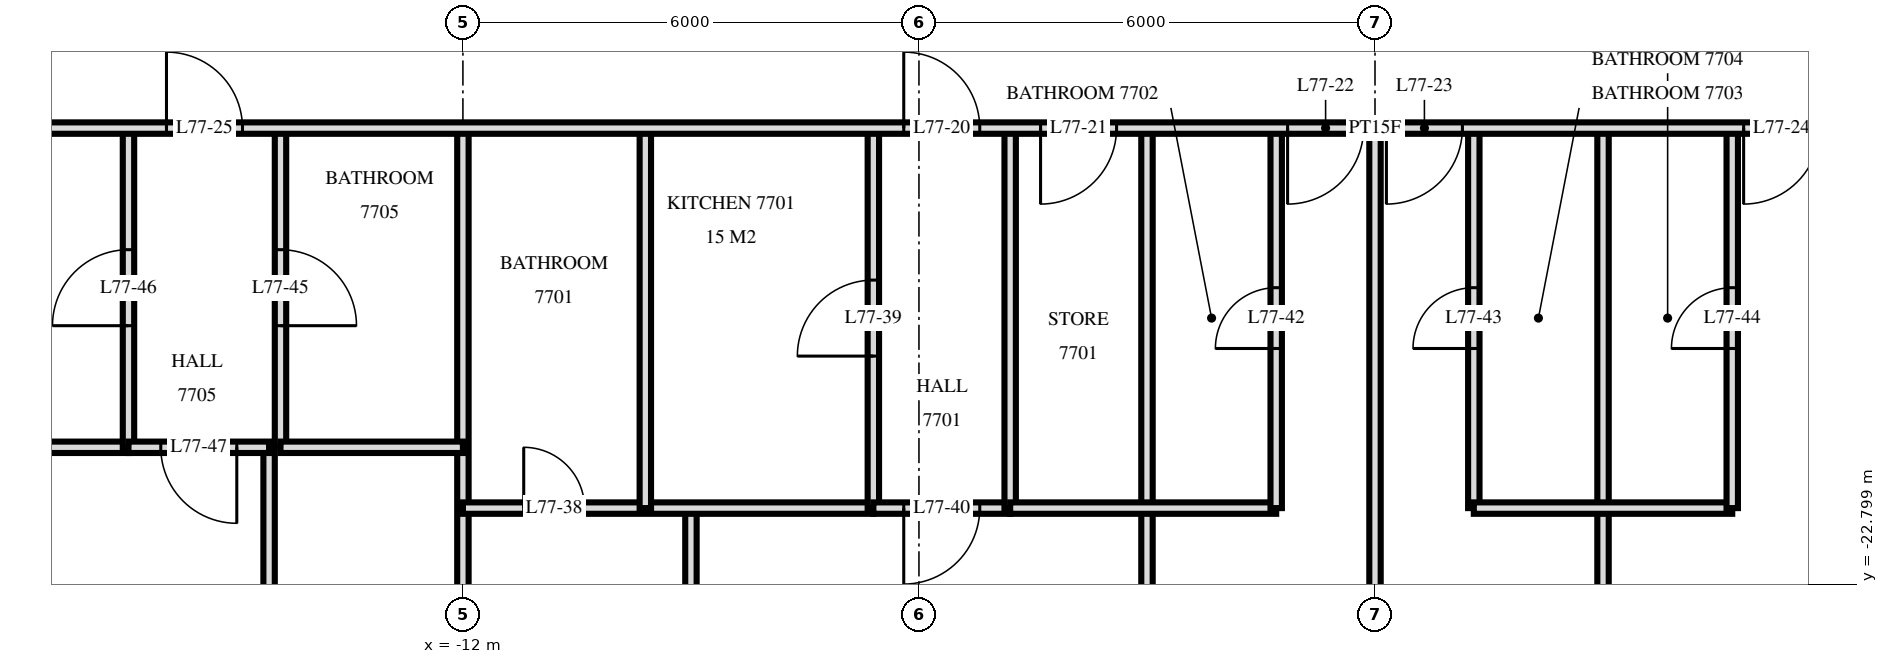
"""IFC4 building model, lengths in metres.
Left out: names, types, materials, properties, quantities, classifications, styles, units other than length and angle.
Written with IfcOpenShell. Run it as: python <this file> out.ifc"""

import sys

from ifc_helpers import new_model, si_unit, direction, frame, frame_2d, origin, place, context, subcontext, project, spatial, rectangle, extrude, element, fill, save


model = new_model("IFC4")
c1 = context("Model", 3, precision=1e-05, world=origin(), true_north=direction((0.0, 1.0)))
c2 = subcontext(c1, "Body", "Model", "MODEL_VIEW")
j1 = project(units=[si_unit("LENGTHUNIT", "METRE"), si_unit("PLANEANGLEUNIT", "RADIAN")], contexts=[c1])
p1 = place(None, origin())
s1 = spatial("IfcSite", under=j1, at=p1, CompositionType="ELEMENT")
p2 = place(p1, origin())
s2 = spatial("IfcBuilding", under=s1, at=p2, CompositionType="ELEMENT")
p3 = place(p2, frame((0.0, 0.0, 291.1)))
s3 = spatial("IfcBuildingStorey", under=s2, at=p3, CompositionType="ELEMENT", Elevation=291.1)
p4 = place(p3, frame((4.7, -21.8, 0.0), z_axis=(0.0, 0.0, 1.0), x_axis=(0.0, 1.0, 0.0)))
e1 = element("IfcWall", 1, at=p4, inside=s3, PredefinedType="PARTITIONING", context=c2, shape_type="SweptSolid", body=[
    extrude(rectangle(XDim=5.0, YDim=0.15, at=frame_2d((2.5, 0.0))), origin(), (0.0, 0.0, 1.0), 3.22),
])
p5 = place(p4, frame((2.1, 0.0, 0.0)))
e2 = element("IfcOpeningElement", 2, at=p5, cuts=e1, PredefinedType="OPENING", context=c2, shape_type="SweptSolid", body=[
    extrude(rectangle(XDim=0.8, YDim=2.1, at=frame_2d((0.4, 1.05))), frame((0.0, 0.085, 0.0), z_axis=(0.0, -1.0, 0.0), x_axis=(1.0, 0.0, 0.0)), (0.0, 0.0, 1.0), 0.17),
])
p6 = place(p3, frame((3.0, -33.62, 0.0), z_axis=(0.0, 0.0, 1.0), x_axis=(0.0, 1.0, 0.0)))
e3 = element("IfcWall", 3, at=p6, inside=s3, PredefinedType="PARTITIONING", context=c2, shape_type="SweptSolid", body=[
    extrude(rectangle(XDim=16.82, YDim=0.15, at=frame_2d((8.41, 0.0))), origin(), (0.0, 0.0, 1.0), 3.22),
])
p7 = place(p3, frame((1.3, -21.8, 0.0), z_axis=(0.0, 0.0, 1.0), x_axis=(0.0, 1.0, 0.0)))
e4 = element("IfcWall", 4, at=p7, inside=s3, PredefinedType="PARTITIONING", context=c2, shape_type="SweptSolid", body=[
    extrude(rectangle(XDim=5.0, YDim=0.15, at=frame_2d((2.5, 0.0))), origin(), (0.0, 0.0, 1.0), 3.22),
])
p8 = place(p7, frame((2.1, 0.0, 0.0)))
e5 = element("IfcOpeningElement", 5, at=p8, cuts=e4, PredefinedType="OPENING", context=c2, shape_type="SweptSolid", body=[
    extrude(rectangle(XDim=0.8, YDim=2.1, at=frame_2d((0.4, 1.05))), frame((0.0, 0.085, 0.0), z_axis=(0.0, -1.0, 0.0), x_axis=(1.0, 0.0, 0.0)), (0.0, 0.0, 1.0), 0.17),
])
p9 = place(p3, frame((0.0, -33.62, 0.0), z_axis=(0.0, 0.0, 1.0), x_axis=(0.0, 1.0, 0.0)))
e6 = element("IfcWall", 6, at=p9, inside=s3, PredefinedType="PARTITIONING", context=c2, shape_type="SweptSolid", body=[
    extrude(rectangle(XDim=16.82, YDim=0.15, at=frame_2d((8.41, 0.0))), origin(), (0.0, 0.0, 1.0), 3.22),
])
p10 = place(p3, frame((-1.3, -21.8, 0.0), z_axis=(0.0, 0.0, 1.0), x_axis=(0.0, 1.0, 0.0)))
e7 = element("IfcWall", 7, at=p10, inside=s3, PredefinedType="PARTITIONING", context=c2, shape_type="SweptSolid", body=[
    extrude(rectangle(XDim=5.0, YDim=0.15, at=frame_2d((2.5, 0.0))), origin(), (0.0, 0.0, 1.0), 3.22),
])
p11 = place(p10, frame((2.1, 0.0, 0.0)))
e8 = element("IfcOpeningElement", 8, at=p11, cuts=e7, PredefinedType="OPENING", context=c2, shape_type="SweptSolid", body=[
    extrude(rectangle(XDim=0.8, YDim=2.1, at=frame_2d((0.4, 1.05))), frame((0.0, 0.085, 0.0), z_axis=(0.0, -1.0, 0.0), x_axis=(1.0, 0.0, 0.0)), (0.0, 0.0, 1.0), 0.17),
])
p12 = place(p3, frame((-3.0, -33.62, 0.0), z_axis=(0.0, 0.0, 1.0), x_axis=(0.0, 1.0, 0.0)))
e9 = element("IfcWall", 9, at=p12, inside=s3, PredefinedType="PARTITIONING", context=c2, shape_type="SweptSolid", body=[
    extrude(rectangle(XDim=16.82, YDim=0.15, at=frame_2d((8.41, 0.0))), origin(), (0.0, 0.0, 1.0), 3.22),
])
p13 = place(p3, frame((-4.8, -21.8, 0.0), z_axis=(0.0, 0.0, 1.0), x_axis=(0.0, 1.0, 0.0)))
e10 = element("IfcWall", 10, at=p13, inside=s3, PredefinedType="PARTITIONING", context=c2, shape_type="SweptSolid", body=[
    extrude(rectangle(XDim=5.0, YDim=0.15, at=frame_2d((2.5, 0.0))), origin(), (0.0, 0.0, 1.0), 3.22),
])
p14 = place(p3, frame((-6.6, -21.8, 0.0), z_axis=(0.0, 0.0, 1.0), x_axis=(0.0, 1.0, 0.0)))
e11 = element("IfcWall", 11, at=p14, inside=s3, PredefinedType="PARTITIONING", context=c2, shape_type="SweptSolid", body=[
    extrude(rectangle(XDim=5.0, YDim=0.15, at=frame_2d((2.5, 0.0))), origin(), (0.0, 0.0, 1.0), 3.22),
])
p15 = place(p14, frame((2.0, 0.0, 0.0)))
e12 = element("IfcOpeningElement", 12, at=p15, cuts=e11, PredefinedType="OPENING", context=c2, shape_type="SweptSolid", body=[
    extrude(rectangle(XDim=1.0, YDim=2.1, at=frame_2d((0.5, 1.05))), frame((0.0, 0.085, 0.0), z_axis=(0.0, -1.0, 0.0), x_axis=(1.0, 0.0, 0.0)), (0.0, 0.0, 1.0), 0.17),
])
p16 = place(p3, frame((-9.0, -33.62, 0.0), z_axis=(0.0, 0.0, 1.0), x_axis=(0.0, 1.0, 0.0)))
e13 = element("IfcWall", 13, at=p16, inside=s3, PredefinedType="PARTITIONING", context=c2, shape_type="SweptSolid", body=[
    extrude(rectangle(XDim=11.82, YDim=0.15, at=frame_2d((5.91, 0.0))), origin(), (0.0, 0.0, 1.0), 3.22),
])
p17 = place(p16, frame((5.37, 0.0, 0.0)))
e14 = element("IfcOpeningElement", 14, at=p17, cuts=e13, PredefinedType="OPENING", context=c2, shape_type="SweptSolid", body=[
    extrude(rectangle(XDim=0.9, YDim=2.1, at=frame_2d((0.45, 1.05))), frame((0.0, 0.085, 0.0), z_axis=(0.0, -1.0, 0.0), x_axis=(1.0, 0.0, 0.0)), (0.0, 0.0, 1.0), 0.17),
])
p18 = place(p3, frame((-9.6, -21.8, 0.0), z_axis=(0.0, 0.0, 1.0), x_axis=(0.0, 1.0, 0.0)))
e15 = element("IfcWall", 15, at=p18, inside=s3, PredefinedType="PARTITIONING", context=c2, shape_type="SweptSolid", body=[
    extrude(rectangle(XDim=5.0, YDim=0.15, at=frame_2d((2.5, 0.0))), origin(), (0.0, 0.0, 1.0), 3.22),
])
p19 = place(p3, frame((-12.0, -33.62, 0.0), z_axis=(0.0, 0.0, 1.0), x_axis=(0.0, 1.0, 0.0)))
e16 = element("IfcWall", 16, at=p19, inside=s3, PredefinedType="PARTITIONING", context=c2, shape_type="SweptSolid", body=[
    extrude(rectangle(XDim=16.82, YDim=0.15, at=frame_2d((8.41, 0.0))), origin(), (0.0, 0.0, 1.0), 3.22),
])
p20 = place(p3, frame((-14.4, -21.0, 0.0), z_axis=(0.0, 0.0, 1.0), x_axis=(0.0, 1.0, 0.0)))
e17 = element("IfcWall", 17, at=p20, inside=s3, PredefinedType="PARTITIONING", context=c2, shape_type="SweptSolid", body=[
    extrude(rectangle(XDim=4.2, YDim=0.15, at=frame_2d((2.1, 0.0))), origin(), (0.0, 0.0, 1.0), 3.22),
])
p21 = place(p20, frame((1.6, 0.0, 0.0)))
e18 = element("IfcOpeningElement", 18, at=p21, cuts=e17, PredefinedType="OPENING", context=c2, shape_type="SweptSolid", body=[
    extrude(rectangle(XDim=1.0, YDim=2.1, at=frame_2d((0.5, 1.05))), frame((0.0, 0.085, 0.0), z_axis=(0.0, -1.0, 0.0), x_axis=(1.0, 0.0, 0.0)), (0.0, 0.0, 1.0), 0.17),
])
p22 = place(p3, frame((-14.55, -33.62, 0.0), z_axis=(0.0, 0.0, 1.0), x_axis=(0.0, 1.0, 0.0)))
e19 = element("IfcWall", 19, at=p22, inside=s3, PredefinedType="PARTITIONING", context=c2, shape_type="SweptSolid", body=[
    extrude(rectangle(XDim=12.62, YDim=0.15, at=frame_2d((6.31, 0.0))), origin(), (0.0, 0.0, 1.0), 3.22),
])
p23 = place(p22, frame((5.77, 0.0, 0.0)))
e20 = element("IfcOpeningElement", 20, at=p23, cuts=e19, PredefinedType="OPENING", context=c2, shape_type="SweptSolid", body=[
    extrude(rectangle(XDim=0.9, YDim=2.1, at=frame_2d((0.45, 1.05))), frame((0.0, 0.085, 0.0), z_axis=(0.0, -1.0, 0.0), x_axis=(1.0, 0.0, 0.0)), (0.0, 0.0, 1.0), 0.17),
])
p24 = place(p3, frame((-16.4, -21.0, 0.0), z_axis=(0.0, 0.0, 1.0), x_axis=(0.0, 1.0, 0.0)))
e21 = element("IfcWall", 21, at=p24, inside=s3, PredefinedType="PARTITIONING", context=c2, shape_type="SweptSolid", body=[
    extrude(rectangle(XDim=4.2, YDim=0.15, at=frame_2d((2.1, 0.0))), origin(), (0.0, 0.0, 1.0), 3.22),
])
p25 = place(p24, frame((1.6, 0.0, 0.0)))
e22 = element("IfcOpeningElement", 22, at=p25, cuts=e21, PredefinedType="OPENING", context=c2, shape_type="SweptSolid", body=[
    extrude(rectangle(XDim=1.0, YDim=2.1, at=frame_2d((0.5, 1.05))), frame((0.0, 0.085, 0.0), z_axis=(0.0, -1.0, 0.0), x_axis=(1.0, 0.0, 0.0)), (0.0, 0.0, 1.0), 0.17),
])
p26 = place(p3, frame((-6.6, -21.8, 0.0), z_axis=(0.0, 0.0, 1.0), x_axis=(1.0, 0.0, 0.0)))
e23 = element("IfcWall", 23, at=p26, inside=s3, PredefinedType="PARTITIONING", context=c2, shape_type="SweptSolid", body=[
    extrude(rectangle(XDim=1.8, YDim=0.15, at=frame_2d((0.9, 0.0))), origin(), (0.0, 0.0, 1.0), 3.22),
])
p27 = place(p26, frame((0.4, 0.0, 0.0)))
e24 = element("IfcOpeningElement", 24, at=p27, cuts=e23, PredefinedType="OPENING", context=c2, shape_type="SweptSolid", body=[
    extrude(rectangle(XDim=1.0, YDim=2.1, at=frame_2d((0.5, 1.05))), frame((0.0, 0.085, 0.0), z_axis=(0.0, -1.0, 0.0), x_axis=(1.0, 0.0, 0.0)), (0.0, 0.0, 1.0), 0.17),
])
p28 = place(p3, frame((-12.0, -21.8, 0.0), z_axis=(0.0, 0.0, 1.0), x_axis=(1.0, 0.0, 0.0)))
e25 = element("IfcWall", 25, at=p28, inside=s3, PredefinedType="PARTITIONING", context=c2, shape_type="SweptSolid", body=[
    extrude(rectangle(XDim=5.4, YDim=0.15, at=frame_2d((2.7, 0.0))), origin(), (0.0, 0.0, 1.0), 3.22),
])
p29 = place(p28, frame((0.8, 0.0, 0.0)))
e26 = element("IfcOpeningElement", 26, at=p29, cuts=e25, PredefinedType="OPENING", context=c2, shape_type="SweptSolid", body=[
    extrude(rectangle(XDim=0.8, YDim=2.1, at=frame_2d((0.4, 1.05))), frame((0.0, 0.085, 0.0), z_axis=(0.0, -1.0, 0.0), x_axis=(1.0, 0.0, 0.0)), (0.0, 0.0, 1.0), 0.17),
])
p30 = place(p3, frame((-4.8, -21.8, 0.0), z_axis=(0.0, 0.0, 1.0), x_axis=(1.0, 0.0, 0.0)))
e27 = element("IfcWall", 27, at=p30, inside=s3, PredefinedType="PARTITIONING", context=c2, shape_type="SweptSolid", body=[
    extrude(rectangle(XDim=3.5, YDim=0.15, at=frame_2d((1.75, 0.0))), origin(), (0.0, 0.0, 1.0), 3.22),
])
p31 = place(p3, frame((1.3, -21.8, 0.0), z_axis=(0.0, 0.0, 1.0), x_axis=(1.0, 0.0, 0.0)))
e28 = element("IfcWall", 28, at=p31, inside=s3, PredefinedType="PARTITIONING", context=c2, shape_type="SweptSolid", body=[
    extrude(rectangle(XDim=3.4, YDim=0.15, at=frame_2d((1.7, 0.0))), origin(), (0.0, 0.0, 1.0), 3.22),
])
p32 = place(p3, frame((-16.4, -21.0, 0.0), z_axis=(0.0, 0.0, 1.0), x_axis=(1.0, 0.0, 0.0)))
e29 = element("IfcWall", 29, at=p32, inside=s3, PredefinedType="PARTITIONING", context=c2, shape_type="SweptSolid", body=[
    extrude(rectangle(XDim=1.85, YDim=0.15, at=frame_2d((0.925, 0.0))), origin(), (0.0, 0.0, 1.0), 3.22),
])
p33 = place(p32, frame((0.425, 0.0, 0.0)))
e30 = element("IfcOpeningElement", 30, at=p33, cuts=e29, PredefinedType="OPENING", context=c2, shape_type="SweptSolid", body=[
    extrude(rectangle(XDim=1.0, YDim=2.1, at=frame_2d((0.5, 1.05))), frame((0.0, 0.085, 0.0), z_axis=(0.0, -1.0, 0.0), x_axis=(1.0, 0.0, 0.0)), (0.0, 0.0, 1.0), 0.17),
])
p34 = place(p3, frame((-20.55, -21.0, 0.0), z_axis=(0.0, 0.0, 1.0), x_axis=(1.0, 0.0, 0.0)))
e31 = element("IfcWall", 31, at=p34, inside=s3, PredefinedType="PARTITIONING", context=c2, shape_type="SweptSolid", body=[
    extrude(rectangle(XDim=4.15, YDim=0.15, at=frame_2d((2.075, 0.0))), origin(), (0.0, 0.0, 1.0), 3.22),
])
p35 = place(p3, frame((-14.4, -21.0, 0.0), z_axis=(0.0, 0.0, 1.0), x_axis=(1.0, 0.0, 0.0)))
e32 = element("IfcWall", 32, at=p35, inside=s3, PredefinedType="PARTITIONING", context=c2, shape_type="SweptSolid", body=[
    extrude(rectangle(XDim=2.4, YDim=0.15, at=frame_2d((1.2, 0.0))), origin(), (0.0, 0.0, 1.0), 3.22),
])
p36 = place(p3, frame((-22.92, -16.8, 0.0), z_axis=(0.0, 0.0, 1.0), x_axis=(1.0, 0.0, 0.0)))
e33 = element("IfcWall", 33, at=p36, inside=s3, PredefinedType="PARTITIONING", context=c2, shape_type="SweptSolid", body=[
    extrude(rectangle(XDim=45.84, YDim=0.15, at=frame_2d((22.92, 0.0))), origin(), (0.0, 0.0, 1.0), 3.22),
])
p37 = place(p36, frame((16.72, 0.0, 0.0)))
e34 = element("IfcOpeningElement", 34, at=p37, cuts=e33, PredefinedType="OPENING", context=c2, shape_type="SweptSolid", body=[
    extrude(rectangle(XDim=1.0, YDim=2.1, at=frame_2d((0.5, 1.05))), frame((0.0, 0.085, 0.0), z_axis=(0.0, -1.0, 0.0), x_axis=(1.0, 0.0, 0.0)), (0.0, 0.0, 1.0), 0.17),
])
p38 = place(p36, frame((18.52, 0.0, 0.0)))
e35 = element("IfcOpeningElement", 35, at=p38, cuts=e33, PredefinedType="OPENING", context=c2, shape_type="SweptSolid", body=[
    extrude(rectangle(XDim=1.0, YDim=2.1, at=frame_2d((0.5, 1.05))), frame((0.0, 0.085, 0.0), z_axis=(0.0, -1.0, 0.0), x_axis=(1.0, 0.0, 0.0)), (0.0, 0.0, 1.0), 0.17),
])
p39 = place(p36, frame((21.77, 0.0, 0.0)))
e36 = element("IfcOpeningElement", 36, at=p39, cuts=e33, PredefinedType="OPENING", context=c2, shape_type="SweptSolid", body=[
    extrude(rectangle(XDim=1.0, YDim=2.1, at=frame_2d((0.5, 1.05))), frame((0.0, 0.085, 0.0), z_axis=(0.0, -1.0, 0.0), x_axis=(1.0, 0.0, 0.0)), (0.0, 0.0, 1.0), 0.17),
])
p40 = place(p36, frame((23.07, 0.0, 0.0)))
e37 = element("IfcOpeningElement", 37, at=p40, cuts=e33, PredefinedType="OPENING", context=c2, shape_type="SweptSolid", body=[
    extrude(rectangle(XDim=1.0, YDim=2.1, at=frame_2d((0.5, 1.05))), frame((0.0, 0.085, 0.0), z_axis=(0.0, -1.0, 0.0), x_axis=(1.0, 0.0, 0.0)), (0.0, 0.0, 1.0), 0.17),
])
p41 = place(p36, frame((27.77, 0.0, 0.0)))
e38 = element("IfcOpeningElement", 38, at=p41, cuts=e33, PredefinedType="OPENING", context=c2, shape_type="SweptSolid", body=[
    extrude(rectangle(XDim=1.0, YDim=2.1, at=frame_2d((0.5, 1.05))), frame((0.0, 0.085, 0.0), z_axis=(0.0, -1.0, 0.0), x_axis=(1.0, 0.0, 0.0)), (0.0, 0.0, 1.0), 0.17),
])
p42 = place(p36, frame((7.02, 0.0, 0.0)))
e39 = element("IfcOpeningElement", 39, at=p42, cuts=e33, PredefinedType="OPENING", context=c2, shape_type="SweptSolid", body=[
    extrude(rectangle(XDim=1.0, YDim=2.1, at=frame_2d((0.5, 1.05))), frame((0.0, 0.085, 0.0), z_axis=(0.0, -1.0, 0.0), x_axis=(1.0, 0.0, 0.0)), (0.0, 0.0, 1.0), 0.17),
])
p43 = place(p36, frame((35.42, 0.0, 0.0)))
e40 = element("IfcOpeningElement", 40, at=p43, cuts=e33, PredefinedType="OPENING", context=c2, shape_type="SweptSolid", body=[
    extrude(rectangle(XDim=1.0, YDim=2.1, at=frame_2d((0.5, 1.05))), frame((0.0, 0.085, 0.0), z_axis=(0.0, -1.0, 0.0), x_axis=(1.0, 0.0, 0.0)), (0.0, 0.0, 1.0), 0.17),
])
p44 = place(p36, frame((42.19, 0.0, 0.0)))
e41 = element("IfcOpeningElement", 41, at=p44, cuts=e33, PredefinedType="OPENING", context=c2, shape_type="SweptSolid", body=[
    extrude(rectangle(XDim=1.0, YDim=2.1, at=frame_2d((0.5, 1.05))), frame((0.0, 0.085, 0.0), z_axis=(0.0, -1.0, 0.0), x_axis=(1.0, 0.0, 0.0)), (0.0, 0.0, 1.0), 0.17),
])
p45 = place(p37, origin())
e42 = element("IfcDoor", 42, at=p45, inside=s3, OperationType="SINGLE_SWING_RIGHT", PredefinedType="DOOR", context=c2, shape_type="SweptSolid", body=[
    extrude(rectangle(XDim=1.0, YDim=2.1, at=frame_2d((0.5, 1.05))), frame((0.0, 0.025, 0.0), z_axis=(0.0, -1.0, 0.0), x_axis=(1.0, 0.0, 0.0)), (0.0, 0.0, 1.0), 0.05),
])
fill(e34, e42)
p46 = place(p38, frame((0.5, 0.0, 0.0), z_axis=(0.0, 0.0, 1.0), x_axis=(-1.0, 0.0, 0.0)))
e43 = element("IfcDoor", 43, at=p46, inside=s3, OperationType="SINGLE_SWING_LEFT", PredefinedType="DOOR", context=c2, shape_type="SweptSolid", body=[
    extrude(rectangle(XDim=1.0, YDim=2.1, at=frame_2d((0.0, 1.05))), frame((0.0, -0.025, 0.0), z_axis=(0.0, 1.0, 0.0), x_axis=(-1.0, 0.0, 0.0)), (0.0, 0.0, 1.0), 0.05),
])
fill(e35, e43)
p47 = place(p39, frame((0.5, 0.0, 0.0), z_axis=(0.0, 0.0, 1.0), x_axis=(-1.0, 0.0, 0.0)))
e44 = element("IfcDoor", 44, at=p47, inside=s3, OperationType="SINGLE_SWING_LEFT", PredefinedType="DOOR", context=c2, shape_type="SweptSolid", body=[
    extrude(rectangle(XDim=1.0, YDim=2.1, at=frame_2d((0.0, 1.05))), frame((0.0, -0.025, 0.0), z_axis=(0.0, 1.0, 0.0), x_axis=(-1.0, 0.0, 0.0)), (0.0, 0.0, 1.0), 0.05),
])
fill(e36, e44)
p48 = place(p40, frame((0.5, 0.0, 0.0), z_axis=(0.0, 0.0, 1.0), x_axis=(-1.0, 0.0, 0.0)))
e45 = element("IfcDoor", 45, at=p48, inside=s3, OperationType="SINGLE_SWING_LEFT", PredefinedType="DOOR", context=c2, shape_type="SweptSolid", body=[
    extrude(rectangle(XDim=1.0, YDim=2.1, at=frame_2d((0.0, 1.05))), frame((0.0, -0.025, 0.0), z_axis=(0.0, 1.0, 0.0), x_axis=(-1.0, 0.0, 0.0)), (0.0, 0.0, 1.0), 0.05),
])
fill(e37, e45)
p49 = place(p41, frame((0.5, 0.0, 0.0), z_axis=(0.0, 0.0, 1.0), x_axis=(-1.0, 0.0, 0.0)))
e46 = element("IfcDoor", 46, at=p49, inside=s3, OperationType="SINGLE_SWING_LEFT", PredefinedType="DOOR", context=c2, shape_type="SweptSolid", body=[
    extrude(rectangle(XDim=1.0, YDim=2.1, at=frame_2d((0.0, 1.05))), frame((0.0, -0.025, 0.0), z_axis=(0.0, 1.0, 0.0), x_axis=(-1.0, 0.0, 0.0)), (0.0, 0.0, 1.0), 0.05),
])
fill(e38, e46)
p50 = place(p42, origin())
e47 = element("IfcDoor", 47, at=p50, inside=s3, OperationType="SINGLE_SWING_RIGHT", PredefinedType="DOOR", context=c2, shape_type="SweptSolid", body=[
    extrude(rectangle(XDim=1.0, YDim=2.1, at=frame_2d((0.5, 1.05))), frame((0.0, 0.025, 0.0), z_axis=(0.0, -1.0, 0.0), x_axis=(1.0, 0.0, 0.0)), (0.0, 0.0, 1.0), 0.05),
])
fill(e39, e47)
p51 = place(p29, origin())
e48 = element("IfcDoor", 48, at=p51, inside=s3, OperationType="SINGLE_SWING_RIGHT", PredefinedType="DOOR", context=c2, shape_type="SweptSolid", body=[
    extrude(rectangle(XDim=0.8, YDim=2.1, at=frame_2d((0.4, 1.05))), frame((0.0, 0.025, 0.0), z_axis=(0.0, -1.0, 0.0), x_axis=(1.0, 0.0, 0.0)), (0.0, 0.0, 1.0), 0.05),
])
fill(e26, e48)
p52 = place(p15, origin())
e49 = element("IfcDoor", 49, at=p52, inside=s3, OperationType="SINGLE_SWING_RIGHT", PredefinedType="DOOR", context=c2, shape_type="SweptSolid", body=[
    extrude(rectangle(XDim=1.0, YDim=2.1, at=frame_2d((0.5, 1.05))), frame((0.0, 0.025, 0.0), z_axis=(0.0, -1.0, 0.0), x_axis=(1.0, 0.0, 0.0)), (0.0, 0.0, 1.0), 0.05),
])
fill(e12, e49)
p53 = place(p27, frame((0.5, 0.0, 0.0), z_axis=(0.0, 0.0, 1.0), x_axis=(-1.0, 0.0, 0.0)))
e50 = element("IfcDoor", 50, at=p53, inside=s3, OperationType="SINGLE_SWING_LEFT", PredefinedType="DOOR", context=c2, shape_type="SweptSolid", body=[
    extrude(rectangle(XDim=1.0, YDim=2.1, at=frame_2d((0.0, 1.05))), frame((0.0, -0.025, 0.0), z_axis=(0.0, 1.0, 0.0), x_axis=(-1.0, 0.0, 0.0)), (0.0, 0.0, 1.0), 0.05),
])
fill(e24, e50)
p54 = place(p11, origin())
e51 = element("IfcDoor", 51, at=p54, inside=s3, OperationType="SINGLE_SWING_RIGHT", PredefinedType="DOOR", context=c2, shape_type="SweptSolid", body=[
    extrude(rectangle(XDim=0.8, YDim=2.1, at=frame_2d((0.4, 1.05))), frame((0.0, 0.025, 0.0), z_axis=(0.0, -1.0, 0.0), x_axis=(1.0, 0.0, 0.0)), (0.0, 0.0, 1.0), 0.05),
])
fill(e8, e51)
p55 = place(p8, origin())
e52 = element("IfcDoor", 52, at=p55, inside=s3, OperationType="SINGLE_SWING_RIGHT", PredefinedType="DOOR", context=c2, shape_type="SweptSolid", body=[
    extrude(rectangle(XDim=0.8, YDim=2.1, at=frame_2d((0.4, 1.05))), frame((0.0, 0.025, 0.0), z_axis=(0.0, -1.0, 0.0), x_axis=(1.0, 0.0, 0.0)), (0.0, 0.0, 1.0), 0.05),
])
fill(e5, e52)
p56 = place(p5, origin())
e53 = element("IfcDoor", 53, at=p56, inside=s3, OperationType="SINGLE_SWING_RIGHT", PredefinedType="DOOR", context=c2, shape_type="SweptSolid", body=[
    extrude(rectangle(XDim=0.8, YDim=2.1, at=frame_2d((0.4, 1.05))), frame((0.0, 0.025, 0.0), z_axis=(0.0, -1.0, 0.0), x_axis=(1.0, 0.0, 0.0)), (0.0, 0.0, 1.0), 0.05),
])
fill(e2, e53)
p57 = place(p21, frame((0.5, 0.0, 0.0), z_axis=(0.0, 0.0, 1.0), x_axis=(-1.0, 0.0, 0.0)))
e54 = element("IfcDoor", 54, at=p57, inside=s3, OperationType="SINGLE_SWING_LEFT", PredefinedType="DOOR", context=c2, shape_type="SweptSolid", body=[
    extrude(rectangle(XDim=1.0, YDim=2.1, at=frame_2d((0.0, 1.05))), frame((0.0, -0.025, 0.0), z_axis=(0.0, 1.0, 0.0), x_axis=(-1.0, 0.0, 0.0)), (0.0, 0.0, 1.0), 0.05),
])
fill(e18, e54)
p58 = place(p25, origin())
e55 = element("IfcDoor", 55, at=p58, inside=s3, OperationType="SINGLE_SWING_RIGHT", PredefinedType="DOOR", context=c2, shape_type="SweptSolid", body=[
    extrude(rectangle(XDim=1.0, YDim=2.1, at=frame_2d((0.5, 1.05))), frame((0.0, 0.025, 0.0), z_axis=(0.0, -1.0, 0.0), x_axis=(1.0, 0.0, 0.0)), (0.0, 0.0, 1.0), 0.05),
])
fill(e22, e55)
p59 = place(p33, frame((0.5, 0.0, 0.0), z_axis=(0.0, 0.0, 1.0), x_axis=(-1.0, 0.0, 0.0)))
e56 = element("IfcDoor", 56, at=p59, inside=s3, OperationType="SINGLE_SWING_RIGHT", PredefinedType="DOOR", context=c2, shape_type="SweptSolid", body=[
    extrude(rectangle(XDim=1.0, YDim=2.1, at=frame_2d((0.0, 1.05))), frame((0.0, -0.025, 0.0), z_axis=(0.0, 1.0, 0.0), x_axis=(-1.0, 0.0, 0.0)), (0.0, 0.0, 1.0), 0.05),
])
fill(e30, e56)
save(model, sys.argv[1])
